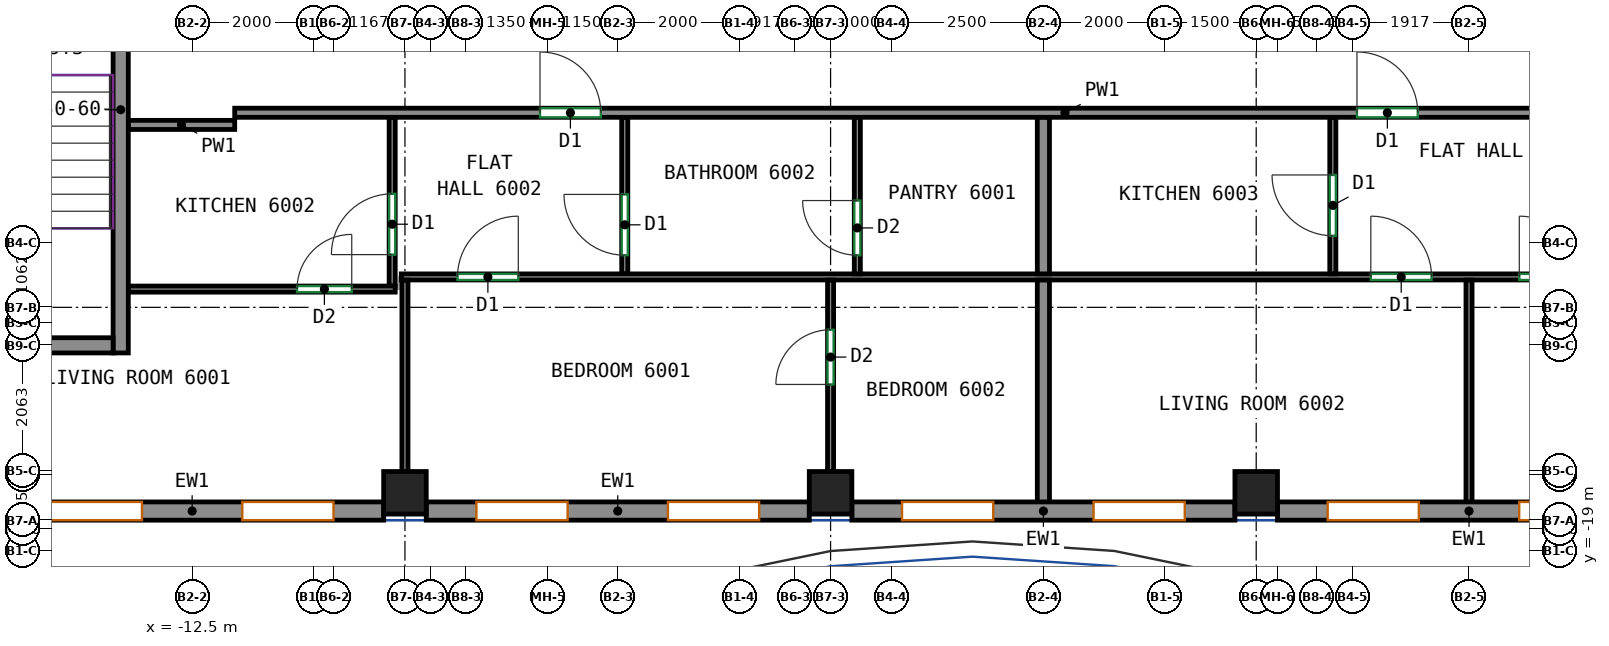
"""IFC4 building model, lengths in metres.
Left out: names, types, materials, properties, quantities, classifications, styles, units other than length and angle.
Written with IfcOpenShell. Run it as: python <this file> out.ifc"""

import sys

from ifc_helpers import new_model, si_unit, direction, frame, frame_2d, origin, origin_2d, place, context, subcontext, project, spatial, rectangle, extrude, source, transform, mapped, element, fill, save


model = new_model("IFC4")
c1 = context("Model", 3, precision=1e-05, world=origin(), true_north=direction((0.0, 1.0)))
c2 = subcontext(c1, "Body", "Model", "MODEL_VIEW")
j1 = project(units=[si_unit("LENGTHUNIT", "METRE"), si_unit("PLANEANGLEUNIT", "RADIAN")], contexts=[c1])
p1 = place(None, origin())
s1 = spatial("IfcSite", under=j1, at=p1, CompositionType="ELEMENT")
p2 = place(p1, origin())
s2 = spatial("IfcBuilding", under=s1, at=p2, CompositionType="ELEMENT")
p3 = place(p2, frame((0.0, 0.0, 249.2)))
s3 = spatial("IfcBuildingStorey", under=s2, at=p3, CompositionType="ELEMENT", Elevation=249.2)
m1 = source(origin(), c2, "Body", "SweptSolid", [
    extrude(rectangle(XDim=0.7, YDim=0.7, at=origin_2d()), origin(), (0.0, 0.0, 1.0), 3.12),
])
for number, where, z_axis, x_axis in (
    (1, (-9.0, -18.05, 0.0), (0.0, 0.0, 1.0), (1.0, 0.0, 0.0)),
    (2, (-2.0, -18.05, 0.0), (0.0, 0.0, 1.0), (1.0, 0.0, 0.0)),
    (3, (5.0, -18.05, 0.0), (0.0, 0.0, 1.0), (1.0, 0.0, 0.0)),
):
    element("IfcColumn", number, at=place(p3, frame(where, z_axis=z_axis, x_axis=x_axis)), inside=s3, PredefinedType="COLUMN", context=c2, shape_type="MappedRepresentation", body=[
        mapped(m1, transform((0.0, 0.0, 0.0))),
    ])
m2 = source(origin(), c2, "Body", "SweptSolid", [
    extrude(rectangle(XDim=8.0, YDim=0.25, at=frame_2d((4.0, 0.0))), origin(), (0.0, 0.0, 1.0), 3.12),
])
p4 = place(p3, frame((-13.675, -15.75, 0.0), z_axis=(0.0, 0.0, 1.0), x_axis=(0.0, 1.0, 0.0)))
e4 = element("IfcWall", 4, at=p4, inside=s3, PredefinedType="SHEAR", context=c2, shape_type="MappedRepresentation", body=[
    mapped(m2, transform((0.0, 0.0, 0.0))),
])
m3 = source(origin(), c2, "Body", "SweptSolid", [
    extrude(rectangle(XDim=3.7, YDim=0.25, at=frame_2d((1.85, 0.0))), origin(), (0.0, 0.0, 1.0), 3.12),
])
p5 = place(p3, frame((-17.5, -15.625, 0.0), z_axis=(0.0, 0.0, 1.0), x_axis=(1.0, 0.0, 0.0)))
e5 = element("IfcWall", 5, at=p5, inside=s3, PredefinedType="SHEAR", context=c2, shape_type="MappedRepresentation", body=[
    mapped(m3, transform((0.0, 0.0, 0.0))),
])
p6 = place(p5, frame((1.25, 0.0, 0.0)))
e6 = element("IfcOpeningElement", 6, at=p6, cuts=e5, PredefinedType="OPENING", context=c2, shape_type="SweptSolid", body=[
    extrude(rectangle(XDim=1.2, YDim=2.1, at=frame_2d((0.6, 1.05))), frame((0.0, 0.135, 0.0), z_axis=(0.0, -1.0, 0.0), x_axis=(1.0, 0.0, 0.0)), (0.0, 0.0, 1.0), 0.27),
])
m4 = source(origin(), c2, "Body", "SweptSolid", [
    extrude(rectangle(XDim=6.3, YDim=0.3, at=frame_2d((3.15, 0.0))), origin(), (0.0, 0.0, 1.0), 3.12),
])
p7 = place(p3, frame((-15.65, -18.35, 0.0), z_axis=(0.0, 0.0, 1.0), x_axis=(1.0, 0.0, 0.0)))
e7 = element("IfcWall", 7, at=p7, inside=s3, PredefinedType="SOLIDWALL", context=c2, shape_type="MappedRepresentation", body=[
    mapped(m4, transform((0.0, 0.0, 0.0))),
])
p8 = place(p7, frame((0.825, 0.0, 0.8)))
e8 = element("IfcOpeningElement", 8, at=p8, cuts=e7, PredefinedType="OPENING", context=c2, shape_type="SweptSolid", body=[
    extrude(rectangle(XDim=1.5, YDim=2.05, at=frame_2d((0.75, 1.025))), frame((0.0, 0.16, 0.0), z_axis=(0.0, -1.0, 0.0), x_axis=(1.0, 0.0, 0.0)), (0.0, 0.0, 1.0), 0.32),
])
p9 = place(p7, frame((3.975, 0.0, 0.8)))
e9 = element("IfcOpeningElement", 9, at=p9, cuts=e7, PredefinedType="OPENING", context=c2, shape_type="SweptSolid", body=[
    extrude(rectangle(XDim=1.5, YDim=2.05, at=frame_2d((0.75, 1.025))), frame((0.0, 0.16, 0.0), z_axis=(0.0, -1.0, 0.0), x_axis=(1.0, 0.0, 0.0)), (0.0, 0.0, 1.0), 0.32),
])
p10 = place(p3, frame((-8.65, -18.35, 0.0), z_axis=(0.0, 0.0, 1.0), x_axis=(1.0, 0.0, 0.0)))
e10 = element("IfcWall", 10, at=p10, inside=s3, PredefinedType="SOLIDWALL", context=c2, shape_type="MappedRepresentation", body=[
    mapped(m4, transform((0.0, 0.0, 0.0))),
])
p11 = place(p10, frame((0.825, 0.0, 0.8)))
e11 = element("IfcOpeningElement", 11, at=p11, cuts=e10, PredefinedType="OPENING", context=c2, shape_type="SweptSolid", body=[
    extrude(rectangle(XDim=1.5, YDim=2.05, at=frame_2d((0.75, 1.025))), frame((0.0, 0.16, 0.0), z_axis=(0.0, -1.0, 0.0), x_axis=(1.0, 0.0, 0.0)), (0.0, 0.0, 1.0), 0.32),
])
p12 = place(p10, frame((3.975, 0.0, 0.8)))
e12 = element("IfcOpeningElement", 12, at=p12, cuts=e10, PredefinedType="OPENING", context=c2, shape_type="SweptSolid", body=[
    extrude(rectangle(XDim=1.5, YDim=2.05, at=frame_2d((0.75, 1.025))), frame((0.0, 0.16, 0.0), z_axis=(0.0, -1.0, 0.0), x_axis=(1.0, 0.0, 0.0)), (0.0, 0.0, 1.0), 0.32),
])
p13 = place(p3, frame((-1.65, -18.35, 0.0), z_axis=(0.0, 0.0, 1.0), x_axis=(1.0, 0.0, 0.0)))
e13 = element("IfcWall", 13, at=p13, inside=s3, PredefinedType="SOLIDWALL", context=c2, shape_type="MappedRepresentation", body=[
    mapped(m4, transform((0.0, 0.0, 0.0))),
])
p14 = place(p13, frame((0.825, 0.0, 0.8)))
e14 = element("IfcOpeningElement", 14, at=p14, cuts=e13, PredefinedType="OPENING", context=c2, shape_type="SweptSolid", body=[
    extrude(rectangle(XDim=1.5, YDim=2.05, at=frame_2d((0.75, 1.025))), frame((0.0, 0.16, 0.0), z_axis=(0.0, -1.0, 0.0), x_axis=(1.0, 0.0, 0.0)), (0.0, 0.0, 1.0), 0.32),
])
p15 = place(p13, frame((3.975, 0.0, 0.8)))
e15 = element("IfcOpeningElement", 15, at=p15, cuts=e13, PredefinedType="OPENING", context=c2, shape_type="SweptSolid", body=[
    extrude(rectangle(XDim=1.5, YDim=2.05, at=frame_2d((0.75, 1.025))), frame((0.0, 0.16, 0.0), z_axis=(0.0, -1.0, 0.0), x_axis=(1.0, 0.0, 0.0)), (0.0, 0.0, 1.0), 0.32),
])
p16 = place(p3, frame((5.35, -18.35, 0.0), z_axis=(0.0, 0.0, 1.0), x_axis=(1.0, 0.0, 0.0)))
e16 = element("IfcWall", 16, at=p16, inside=s3, PredefinedType="SOLIDWALL", context=c2, shape_type="MappedRepresentation", body=[
    mapped(m4, transform((0.0, 0.0, 0.0))),
])
p17 = place(p16, frame((0.825, 0.0, 0.8)))
e17 = element("IfcOpeningElement", 17, at=p17, cuts=e16, PredefinedType="OPENING", context=c2, shape_type="SweptSolid", body=[
    extrude(rectangle(XDim=1.5, YDim=2.05, at=frame_2d((0.75, 1.025))), frame((0.0, 0.16, 0.0), z_axis=(0.0, -1.0, 0.0), x_axis=(1.0, 0.0, 0.0)), (0.0, 0.0, 1.0), 0.32),
])
p18 = place(p16, frame((3.975, 0.0, 0.8)))
e18 = element("IfcOpeningElement", 18, at=p18, cuts=e16, PredefinedType="OPENING", context=c2, shape_type="SweptSolid", body=[
    extrude(rectangle(XDim=1.5, YDim=2.05, at=frame_2d((0.75, 1.025))), frame((0.0, 0.16, 0.0), z_axis=(0.0, -1.0, 0.0), x_axis=(1.0, 0.0, 0.0)), (0.0, 0.0, 1.0), 0.32),
])
p19 = place(p3, frame((-11.8, -11.8, 0.0), z_axis=(0.0, 0.0, 1.0), x_axis=(1.0, 0.0, 0.0)))
e19 = element("IfcWall", 19, at=p19, inside=s3, PredefinedType="PARTITIONING", context=c2, shape_type="SweptSolid", body=[
    extrude(rectangle(XDim=27.31, YDim=0.15, at=frame_2d((13.655, 0.0))), origin(), (0.0, 0.0, 1.0), 3.12),
])
p20 = place(p19, frame((5.021, 0.0, 0.0)))
e20 = element("IfcOpeningElement", 20, at=p20, cuts=e19, PredefinedType="OPENING", context=c2, shape_type="SweptSolid", body=[
    extrude(rectangle(XDim=1.0, YDim=2.1, at=frame_2d((0.5, 1.05))), frame((0.0, 0.085, 0.0), z_axis=(0.0, -1.0, 0.0), x_axis=(1.0, 0.0, 0.0)), (0.0, 0.0, 1.0), 0.17),
])
p21 = place(p19, frame((18.457, 0.0, 0.0)))
e21 = element("IfcOpeningElement", 21, at=p21, cuts=e19, PredefinedType="OPENING", context=c2, shape_type="SweptSolid", body=[
    extrude(rectangle(XDim=1.0, YDim=2.1, at=frame_2d((0.5, 1.05))), frame((0.0, 0.085, 0.0), z_axis=(0.0, -1.0, 0.0), x_axis=(1.0, 0.0, 0.0)), (0.0, 0.0, 1.0), 0.17),
])
p22 = place(p3, frame((-13.55, -12.0, 0.0), z_axis=(0.0, 0.0, 1.0), x_axis=(1.0, 0.0, 0.0)))
e22 = element("IfcWall", 22, at=p22, inside=s3, PredefinedType="PARTITIONING", context=c2, shape_type="SweptSolid", body=[
    extrude(rectangle(XDim=1.75, YDim=0.15, at=frame_2d((0.875, 0.0))), origin(), (0.0, 0.0, 1.0), 3.12),
])
p23 = place(p3, frame((-9.21, -14.65, 0.0), z_axis=(0.0, 0.0, 1.0), x_axis=(0.0, 1.0, 0.0)))
e23 = element("IfcWall", 23, at=p23, inside=s3, PredefinedType="PARTITIONING", context=c2, shape_type="SweptSolid", body=[
    extrude(rectangle(XDim=2.773, YDim=0.1, at=frame_2d((1.386, 0.0))), origin(), (0.0, 0.0, 1.0), 3.12),
])
p24 = place(p23, frame((0.517, 0.0, 0.0)))
e24 = element("IfcOpeningElement", 24, at=p24, cuts=e23, PredefinedType="OPENING", context=c2, shape_type="SweptSolid", body=[
    extrude(rectangle(XDim=1.0, YDim=2.1, at=frame_2d((0.5, 1.05))), frame((0.0, 0.06, 0.0), z_axis=(0.0, -1.0, 0.0), x_axis=(1.0, 0.0, 0.0)), (0.0, 0.0, 1.0), 0.12),
])
p25 = place(p3, frame((-13.55, -14.7, 0.0), z_axis=(0.0, 0.0, 1.0), x_axis=(1.0, 0.0, 0.0)))
e25 = element("IfcWall", 25, at=p25, inside=s3, PredefinedType="PARTITIONING", context=c2, shape_type="SweptSolid", body=[
    extrude(rectangle(XDim=4.39, YDim=0.1, at=frame_2d((2.195, 0.0))), origin(), (0.0, 0.0, 1.0), 3.12),
])
p26 = place(p25, frame((2.775, 0.0, 0.0)))
e26 = element("IfcOpeningElement", 26, at=p26, cuts=e25, PredefinedType="OPENING", context=c2, shape_type="SweptSolid", body=[
    extrude(rectangle(XDim=0.9, YDim=2.1, at=frame_2d((0.45, 1.05))), frame((0.0, 0.06, 0.0), z_axis=(0.0, -1.0, 0.0), x_axis=(1.0, 0.0, 0.0)), (0.0, 0.0, 1.0), 0.12),
])
p27 = place(p3, frame((-5.385, -14.45, 0.0), z_axis=(0.0, 0.0, 1.0), x_axis=(0.0, 1.0, 0.0)))
e27 = element("IfcWall", 27, at=p27, inside=s3, PredefinedType="PARTITIONING", context=c2, shape_type="SweptSolid", body=[
    extrude(rectangle(XDim=2.573, YDim=0.1, at=frame_2d((1.287, 0.0))), origin(), (0.0, 0.0, 1.0), 3.12),
])
p28 = place(p27, frame((0.307, 0.0, 0.0)))
e28 = element("IfcOpeningElement", 28, at=p28, cuts=e27, PredefinedType="OPENING", context=c2, shape_type="SweptSolid", body=[
    extrude(rectangle(XDim=1.0, YDim=2.1, at=frame_2d((0.5, 1.05))), frame((0.0, 0.06, 0.0), z_axis=(0.0, -1.0, 0.0), x_axis=(1.0, 0.0, 0.0)), (0.0, 0.0, 1.0), 0.12),
])
p29 = place(p3, frame((-9.06, -14.5, 0.0), z_axis=(0.0, 0.0, 1.0), x_axis=(1.0, 0.0, 0.0)))
e29 = element("IfcWall", 29, at=p29, inside=s3, PredefinedType="PARTITIONING", context=c2, shape_type="SweptSolid", body=[
    extrude(rectangle(XDim=24.66, YDim=0.1, at=frame_2d((12.33, 0.0))), origin(), (0.0, 0.0, 1.0), 3.12),
])
p30 = place(p29, frame((0.924, 0.0, 0.0)))
e30 = element("IfcOpeningElement", 30, at=p30, cuts=e29, PredefinedType="OPENING", context=c2, shape_type="SweptSolid", body=[
    extrude(rectangle(XDim=1.0, YDim=2.1, at=frame_2d((0.5, 1.05))), frame((0.0, 0.06, 0.0), z_axis=(0.0, -1.0, 0.0), x_axis=(1.0, 0.0, 0.0)), (0.0, 0.0, 1.0), 0.12),
])
p31 = place(p29, frame((15.945, 0.0, 0.0)))
e31 = element("IfcOpeningElement", 31, at=p31, cuts=e29, PredefinedType="OPENING", context=c2, shape_type="SweptSolid", body=[
    extrude(rectangle(XDim=1.0, YDim=2.1, at=frame_2d((0.5, 1.05))), frame((0.0, 0.06, 0.0), z_axis=(0.0, -1.0, 0.0), x_axis=(1.0, 0.0, 0.0)), (0.0, 0.0, 1.0), 0.12),
])
p32 = place(p29, frame((18.387, 0.0, 0.0)))
e32 = element("IfcOpeningElement", 32, at=p32, cuts=e29, PredefinedType="OPENING", context=c2, shape_type="SweptSolid", body=[
    extrude(rectangle(XDim=1.0, YDim=2.1, at=frame_2d((0.5, 1.05))), frame((0.0, 0.06, 0.0), z_axis=(0.0, -1.0, 0.0), x_axis=(1.0, 0.0, 0.0)), (0.0, 0.0, 1.0), 0.12),
])
p33 = place(p3, frame((-1.56, -14.45, 0.0), z_axis=(0.0, 0.0, 1.0), x_axis=(0.0, 1.0, 0.0)))
e33 = element("IfcWall", 33, at=p33, inside=s3, PredefinedType="PARTITIONING", context=c2, shape_type="SweptSolid", body=[
    extrude(rectangle(XDim=2.573, YDim=0.1, at=frame_2d((1.287, 0.0))), origin(), (0.0, 0.0, 1.0), 3.12),
])
p34 = place(p33, frame((0.306, 0.0, 0.0)))
e34 = element("IfcOpeningElement", 34, at=p34, cuts=e33, PredefinedType="OPENING", context=c2, shape_type="SweptSolid", body=[
    extrude(rectangle(XDim=0.9, YDim=2.1, at=frame_2d((0.45, 1.05))), frame((0.0, 0.06, 0.0), z_axis=(0.0, -1.0, 0.0), x_axis=(1.0, 0.0, 0.0)), (0.0, 0.0, 1.0), 0.12),
])
p35 = place(p3, frame((1.5, -14.45, 0.0), z_axis=(0.0, 0.0, 1.0), x_axis=(0.0, 1.0, 0.0)))
e35 = element("IfcWall", 35, at=p35, inside=s3, PredefinedType="PARTITIONING", context=c2, shape_type="SweptSolid", body=[
    extrude(rectangle(XDim=2.573, YDim=0.2, at=frame_2d((1.287, 0.0))), origin(), (0.0, 0.0, 1.0), 3.12),
])
p36 = place(p3, frame((-9.0, -17.7, 0.0), z_axis=(0.0, 0.0, 1.0), x_axis=(0.0, 1.0, 0.0)))
e36 = element("IfcWall", 36, at=p36, inside=s3, PredefinedType="PARTITIONING", context=c2, shape_type="SweptSolid", body=[
    extrude(rectangle(XDim=3.148, YDim=0.1, at=frame_2d((1.574, 0.0))), origin(), (0.0, 0.0, 1.0), 3.12),
])
p37 = place(p3, frame((-2.0, -17.7, 0.0), z_axis=(0.0, 0.0, 1.0), x_axis=(0.0, 1.0, 0.0)))
e37 = element("IfcWall", 37, at=p37, inside=s3, PredefinedType="PARTITIONING", context=c2, shape_type="SweptSolid", body=[
    extrude(rectangle(XDim=3.148, YDim=0.1, at=frame_2d((1.574, 0.0))), origin(), (0.0, 0.0, 1.0), 3.12),
])
p38 = place(p37, frame((1.432, 0.0, 0.0)))
e38 = element("IfcOpeningElement", 38, at=p38, cuts=e37, PredefinedType="OPENING", context=c2, shape_type="SweptSolid", body=[
    extrude(rectangle(XDim=0.9, YDim=2.1, at=frame_2d((0.45, 1.05))), frame((0.0, 0.06, 0.0), z_axis=(0.0, -1.0, 0.0), x_axis=(1.0, 0.0, 0.0)), (0.0, 0.0, 1.0), 0.12),
])
p39 = place(p3, frame((1.5, -18.25, 0.0), z_axis=(0.0, 0.0, 1.0), x_axis=(0.0, 1.0, 0.0)))
e39 = element("IfcWall", 39, at=p39, inside=s3, PredefinedType="PARTITIONING", context=c2, shape_type="SweptSolid", body=[
    extrude(rectangle(XDim=3.698, YDim=0.2, at=frame_2d((1.849, 0.0))), origin(), (0.0, 0.0, 1.0), 3.12),
])
p40 = place(p3, frame((6.26, -14.45, 0.0), z_axis=(0.0, 0.0, 1.0), x_axis=(0.0, 1.0, 0.0)))
e40 = element("IfcWall", 40, at=p40, inside=s3, PredefinedType="PARTITIONING", context=c2, shape_type="SweptSolid", body=[
    extrude(rectangle(XDim=2.573, YDim=0.1, at=frame_2d((1.287, 0.0))), origin(), (0.0, 0.0, 1.0), 3.12),
])
p41 = place(p40, frame((0.627, 0.0, 0.0)))
e41 = element("IfcOpeningElement", 41, at=p41, cuts=e40, PredefinedType="OPENING", context=c2, shape_type="SweptSolid", body=[
    extrude(rectangle(XDim=1.0, YDim=2.1, at=frame_2d((0.5, 1.05))), frame((0.0, 0.06, 0.0), z_axis=(0.0, -1.0, 0.0), x_axis=(1.0, 0.0, 0.0)), (0.0, 0.0, 1.0), 0.12),
])
p42 = place(p3, frame((8.5, -18.25, 0.0), z_axis=(0.0, 0.0, 1.0), x_axis=(0.0, 1.0, 0.0)))
e42 = element("IfcWall", 42, at=p42, inside=s3, PredefinedType="PARTITIONING", context=c2, shape_type="SweptSolid", body=[
    extrude(rectangle(XDim=3.698, YDim=0.1, at=frame_2d((1.849, 0.0))), origin(), (0.0, 0.0, 1.0), 3.12),
])
p43 = place(p8, origin())
e43 = element("IfcWindow", 43, at=p43, inside=s3, PartitioningType="SINGLE_PANEL", PredefinedType="WINDOW", context=c2, shape_type="SweptSolid", body=[
    extrude(rectangle(XDim=1.5, YDim=2.05, at=frame_2d((0.75, 1.025))), frame((0.0, 0.03, 0.0), z_axis=(0.0, -1.0, 0.0), x_axis=(1.0, 0.0, 0.0)), (0.0, 0.0, 1.0), 0.06),
])
fill(e8, e43)
p44 = place(p9, origin())
e44 = element("IfcWindow", 44, at=p44, inside=s3, PartitioningType="SINGLE_PANEL", PredefinedType="WINDOW", context=c2, shape_type="SweptSolid", body=[
    extrude(rectangle(XDim=1.5, YDim=2.05, at=frame_2d((0.75, 1.025))), frame((0.0, 0.03, 0.0), z_axis=(0.0, -1.0, 0.0), x_axis=(1.0, 0.0, 0.0)), (0.0, 0.0, 1.0), 0.06),
])
fill(e9, e44)
p45 = place(p11, origin())
e45 = element("IfcWindow", 45, at=p45, inside=s3, PartitioningType="SINGLE_PANEL", PredefinedType="WINDOW", context=c2, shape_type="SweptSolid", body=[
    extrude(rectangle(XDim=1.5, YDim=2.05, at=frame_2d((0.75, 1.025))), frame((0.0, 0.03, 0.0), z_axis=(0.0, -1.0, 0.0), x_axis=(1.0, 0.0, 0.0)), (0.0, 0.0, 1.0), 0.06),
])
fill(e11, e45)
p46 = place(p12, origin())
e46 = element("IfcWindow", 46, at=p46, inside=s3, PartitioningType="SINGLE_PANEL", PredefinedType="WINDOW", context=c2, shape_type="SweptSolid", body=[
    extrude(rectangle(XDim=1.5, YDim=2.05, at=frame_2d((0.75, 1.025))), frame((0.0, 0.03, 0.0), z_axis=(0.0, -1.0, 0.0), x_axis=(1.0, 0.0, 0.0)), (0.0, 0.0, 1.0), 0.06),
])
fill(e12, e46)
p47 = place(p14, origin())
e47 = element("IfcWindow", 47, at=p47, inside=s3, PartitioningType="SINGLE_PANEL", PredefinedType="WINDOW", context=c2, shape_type="SweptSolid", body=[
    extrude(rectangle(XDim=1.5, YDim=2.05, at=frame_2d((0.75, 1.025))), frame((0.0, 0.03, 0.0), z_axis=(0.0, -1.0, 0.0), x_axis=(1.0, 0.0, 0.0)), (0.0, 0.0, 1.0), 0.06),
])
fill(e14, e47)
p48 = place(p15, origin())
e48 = element("IfcWindow", 48, at=p48, inside=s3, PartitioningType="SINGLE_PANEL", PredefinedType="WINDOW", context=c2, shape_type="SweptSolid", body=[
    extrude(rectangle(XDim=1.5, YDim=2.05, at=frame_2d((0.75, 1.025))), frame((0.0, 0.03, 0.0), z_axis=(0.0, -1.0, 0.0), x_axis=(1.0, 0.0, 0.0)), (0.0, 0.0, 1.0), 0.06),
])
fill(e15, e48)
p49 = place(p17, origin())
e49 = element("IfcWindow", 49, at=p49, inside=s3, PartitioningType="SINGLE_PANEL", PredefinedType="WINDOW", context=c2, shape_type="SweptSolid", body=[
    extrude(rectangle(XDim=1.5, YDim=2.05, at=frame_2d((0.75, 1.025))), frame((0.0, 0.03, 0.0), z_axis=(0.0, -1.0, 0.0), x_axis=(1.0, 0.0, 0.0)), (0.0, 0.0, 1.0), 0.06),
])
fill(e17, e49)
p50 = place(p18, origin())
e50 = element("IfcWindow", 50, at=p50, inside=s3, PartitioningType="SINGLE_PANEL", PredefinedType="WINDOW", context=c2, shape_type="SweptSolid", body=[
    extrude(rectangle(XDim=1.5, YDim=2.05, at=frame_2d((0.75, 1.025))), frame((0.0, 0.03, 0.0), z_axis=(0.0, -1.0, 0.0), x_axis=(1.0, 0.0, 0.0)), (0.0, 0.0, 1.0), 0.06),
])
fill(e18, e50)
p51 = place(p38, origin())
e51 = element("IfcDoor", 51, at=p51, inside=s3, OperationType="SINGLE_SWING_LEFT", PredefinedType="DOOR", context=c2, shape_type="SweptSolid", body=[
    extrude(rectangle(XDim=0.9, YDim=2.1, at=frame_2d((0.45, 1.05))), frame((0.0, 0.025, 0.0), z_axis=(0.0, -1.0, 0.0), x_axis=(1.0, 0.0, 0.0)), (0.0, 0.0, 1.0), 0.05),
])
fill(e38, e51)
p52 = place(p26, origin())
e52 = element("IfcDoor", 52, at=p52, inside=s3, OperationType="SINGLE_SWING_RIGHT", PredefinedType="DOOR", context=c2, shape_type="SweptSolid", body=[
    extrude(rectangle(XDim=0.9, YDim=2.1, at=frame_2d((0.45, 1.05))), frame((0.0, 0.025, 0.0), z_axis=(0.0, -1.0, 0.0), x_axis=(1.0, 0.0, 0.0)), (0.0, 0.0, 1.0), 0.05),
])
fill(e26, e52)
p53 = place(p30, origin())
e53 = element("IfcDoor", 53, at=p53, inside=s3, OperationType="SINGLE_SWING_RIGHT", PredefinedType="DOOR", context=c2, shape_type="SweptSolid", body=[
    extrude(rectangle(XDim=1.0, YDim=2.1, at=frame_2d((0.5, 1.05))), frame((0.0, 0.025, 0.0), z_axis=(0.0, -1.0, 0.0), x_axis=(1.0, 0.0, 0.0)), (0.0, 0.0, 1.0), 0.05),
])
fill(e30, e53)
p54 = place(p31, origin())
e54 = element("IfcDoor", 54, at=p54, inside=s3, OperationType="SINGLE_SWING_LEFT", PredefinedType="DOOR", context=c2, shape_type="SweptSolid", body=[
    extrude(rectangle(XDim=1.0, YDim=2.1, at=frame_2d((0.5, 1.05))), frame((0.0, 0.025, 0.0), z_axis=(0.0, -1.0, 0.0), x_axis=(1.0, 0.0, 0.0)), (0.0, 0.0, 1.0), 0.05),
])
fill(e31, e54)
p55 = place(p32, origin())
e55 = element("IfcDoor", 55, at=p55, inside=s3, OperationType="SINGLE_SWING_LEFT", PredefinedType="DOOR", context=c2, shape_type="SweptSolid", body=[
    extrude(rectangle(XDim=1.0, YDim=2.1, at=frame_2d((0.5, 1.05))), frame((0.0, 0.025, 0.0), z_axis=(0.0, -1.0, 0.0), x_axis=(1.0, 0.0, 0.0)), (0.0, 0.0, 1.0), 0.05),
])
fill(e32, e55)
p56 = place(p34, origin())
e56 = element("IfcDoor", 56, at=p56, inside=s3, OperationType="SINGLE_SWING_RIGHT", PredefinedType="DOOR", context=c2, shape_type="SweptSolid", body=[
    extrude(rectangle(XDim=0.9, YDim=2.1, at=frame_2d((0.45, 1.05))), frame((0.0, 0.025, 0.0), z_axis=(0.0, -1.0, 0.0), x_axis=(1.0, 0.0, 0.0)), (0.0, 0.0, 1.0), 0.05),
])
fill(e34, e56)
p57 = place(p28, origin())
e57 = element("IfcDoor", 57, at=p57, inside=s3, OperationType="SINGLE_SWING_RIGHT", PredefinedType="DOOR", context=c2, shape_type="SweptSolid", body=[
    extrude(rectangle(XDim=1.0, YDim=2.1, at=frame_2d((0.5, 1.05))), frame((0.0, 0.025, 0.0), z_axis=(0.0, -1.0, 0.0), x_axis=(1.0, 0.0, 0.0)), (0.0, 0.0, 1.0), 0.05),
])
fill(e28, e57)
p58 = place(p24, origin())
e58 = element("IfcDoor", 58, at=p58, inside=s3, OperationType="SINGLE_SWING_LEFT", PredefinedType="DOOR", context=c2, shape_type="SweptSolid", body=[
    extrude(rectangle(XDim=1.0, YDim=2.1, at=frame_2d((0.5, 1.05))), frame((0.0, 0.025, 0.0), z_axis=(0.0, -1.0, 0.0), x_axis=(1.0, 0.0, 0.0)), (0.0, 0.0, 1.0), 0.05),
])
fill(e24, e58)
p59 = place(p41, origin())
e59 = element("IfcDoor", 59, at=p59, inside=s3, OperationType="SINGLE_SWING_RIGHT", PredefinedType="DOOR", context=c2, shape_type="SweptSolid", body=[
    extrude(rectangle(XDim=1.0, YDim=2.1, at=frame_2d((0.5, 1.05))), frame((0.0, 0.025, 0.0), z_axis=(0.0, -1.0, 0.0), x_axis=(1.0, 0.0, 0.0)), (0.0, 0.0, 1.0), 0.05),
])
fill(e41, e59)
p60 = place(p20, origin())
e60 = element("IfcDoor", 60, at=p60, inside=s3, OperationType="SINGLE_SWING_LEFT", PredefinedType="DOOR", context=c2, shape_type="SweptSolid", body=[
    extrude(rectangle(XDim=1.0, YDim=2.1, at=frame_2d((0.5, 1.05))), frame((0.0, 0.025, 0.0), z_axis=(0.0, -1.0, 0.0), x_axis=(1.0, 0.0, 0.0)), (0.0, 0.0, 1.0), 0.05),
])
fill(e20, e60)
p61 = place(p21, origin())
e61 = element("IfcDoor", 61, at=p61, inside=s3, OperationType="SINGLE_SWING_LEFT", PredefinedType="DOOR", context=c2, shape_type="SweptSolid", body=[
    extrude(rectangle(XDim=1.0, YDim=2.1, at=frame_2d((0.5, 1.05))), frame((0.0, 0.025, 0.0), z_axis=(0.0, -1.0, 0.0), x_axis=(1.0, 0.0, 0.0)), (0.0, 0.0, 1.0), 0.05),
])
fill(e21, e61)
save(model, sys.argv[1])
